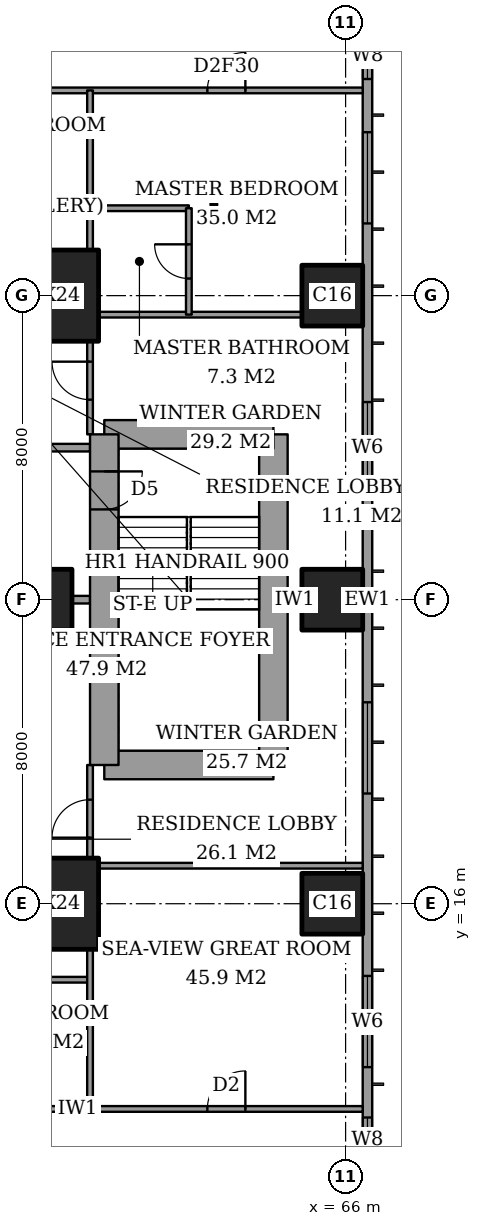
"""IFC4 building model, lengths in metres.
Left out: names, types, materials, properties, quantities, classifications, styles, units other than length and angle.
Written with IfcOpenShell. Run it as: python <this file> out.ifc"""

import sys

from ifc_helpers import new_model, si_unit, direction, frame, frame_2d, origin, origin_2d, place, context, subcontext, project, spatial, rectangle, extrude, element, fill, save


model = new_model("IFC4")
c1 = context("Model", 3, precision=1e-05, world=origin(), true_north=direction((0.0, 1.0)))
c2 = subcontext(c1, "Body", "Model", "MODEL_VIEW")
j1 = project(units=[si_unit("LENGTHUNIT", "METRE"), si_unit("PLANEANGLEUNIT", "RADIAN")], contexts=[c1])
p1 = place(None, origin())
s1 = spatial("IfcSite", under=j1, at=p1, CompositionType="ELEMENT")
p2 = place(p1, origin())
s2 = spatial("IfcBuilding", under=s1, at=p2, CompositionType="ELEMENT")
p3 = place(p2, frame((0.0, 0.0, 270.0)))
s3 = spatial("IfcBuildingStorey", under=s2, at=p3, CompositionType="ELEMENT", Elevation=270.0)
p4 = place(p3, frame((58.0, 16.0, 0.0), z_axis=(0.0, 0.0, 1.0), x_axis=(1.0, 0.0, 0.0)))
e1 = element("IfcColumn", 1, at=p4, inside=s3, PredefinedType="COLUMN", context=c2, shape_type="SweptSolid", body=[
    extrude(rectangle(XDim=3.0, YDim=2.4, at=origin_2d()), origin(), (0.0, 0.0, 1.0), 3.6),
])
p5 = place(p3, frame((58.0, 24.0, 0.0), z_axis=(0.0, 0.0, 1.0), x_axis=(1.0, 0.0, 0.0)))
e2 = element("IfcColumn", 2, at=p5, inside=s3, PredefinedType="COLUMN", context=c2, shape_type="SweptSolid", body=[
    extrude(rectangle(XDim=1.6, YDim=1.6, at=origin_2d()), origin(), (0.0, 0.0, 1.0), 3.6),
])
p6 = place(p3, frame((58.0, 32.0, 0.0), z_axis=(0.0, 0.0, 1.0), x_axis=(1.0, 0.0, 0.0)))
e3 = element("IfcColumn", 3, at=p6, inside=s3, PredefinedType="COLUMN", context=c2, shape_type="SweptSolid", body=[
    extrude(rectangle(XDim=3.0, YDim=2.4, at=origin_2d()), origin(), (0.0, 0.0, 1.0), 3.6),
])
for number, where, z_axis, x_axis in (
    (4, (65.65, 16.0, 0.0), (0.0, 0.0, 1.0), (1.0, 0.0, 0.0)),
    (5, (65.65, 24.0, 0.0), (0.0, 0.0, 1.0), (1.0, 0.0, 0.0)),
    (6, (65.65, 32.0, 0.0), (0.0, 0.0, 1.0), (1.0, 0.0, 0.0)),
):
    element("IfcColumn", number, at=place(p3, frame(where, z_axis=z_axis, x_axis=x_axis)), inside=s3, PredefinedType="COLUMN", context=c2, shape_type="SweptSolid", body=[
        extrude(rectangle(XDim=1.6, YDim=1.6, at=origin_2d()), origin(), (0.0, 0.0, 1.0), 3.6),
    ])
p7 = place(p3, frame((59.65, 19.65, 0.0), z_axis=(0.0, 0.0, 1.0), x_axis=(1.0, 0.0, 0.0)))
e7 = element("IfcWall", 7, at=p7, inside=s3, PredefinedType="SHEAR", context=c2, shape_type="SweptSolid", body=[
    extrude(rectangle(XDim=4.45, YDim=0.75, at=frame_2d((2.225, 0.0))), origin(), (0.0, 0.0, 1.0), 3.6),
])
p8 = place(p3, frame((64.1, 19.65, 0.0), z_axis=(0.0, 0.0, 1.0), x_axis=(0.0, 1.0, 0.0)))
e8 = element("IfcWall", 8, at=p8, inside=s3, PredefinedType="SHEAR", context=c2, shape_type="SweptSolid", body=[
    extrude(rectangle(XDim=8.7, YDim=0.75, at=frame_2d((4.35, 0.0))), origin(), (0.0, 0.0, 1.0), 3.6),
])
p9 = place(p3, frame((64.1, 28.35, 0.0), z_axis=(0.0, 0.0, 1.0), x_axis=(-1.0, 0.0, 0.0)))
e9 = element("IfcWall", 9, at=p9, inside=s3, PredefinedType="SHEAR", context=c2, shape_type="SweptSolid", body=[
    extrude(rectangle(XDim=4.45, YDim=0.75, at=frame_2d((2.225, 0.0))), origin(), (0.0, 0.0, 1.0), 3.6),
])
p10 = place(p3, frame((59.65, 28.35, 0.0), z_axis=(0.0, 0.0, 1.0), x_axis=(0.0, -1.0, 0.0)))
e10 = element("IfcWall", 10, at=p10, inside=s3, PredefinedType="SHEAR", context=c2, shape_type="SweptSolid", body=[
    extrude(rectangle(XDim=8.7, YDim=0.75, at=frame_2d((4.35, 0.0))), origin(), (0.0, 0.0, 1.0), 3.6),
])
p11 = place(p10, frame((0.975, 0.0, 0.0)))
e11 = element("IfcOpeningElement", 11, at=p11, cuts=e10, PredefinedType="OPENING", context=c2, shape_type="SweptSolid", body=[
    extrude(rectangle(XDim=1.0, YDim=2.1, at=frame_2d((0.5, 1.05))), frame((0.0, 0.385, 0.0), z_axis=(0.0, -1.0, 0.0), x_axis=(1.0, 0.0, 0.0)), (0.0, 0.0, 1.0), 0.77),
])
p12 = place(p3, frame((66.575, 3.175, 0.0), z_axis=(0.0, 0.0, 1.0), x_axis=(0.0, 1.0, 0.0)))
e12 = element("IfcWall", 12, at=p12, inside=s3, PredefinedType="SOLIDWALL", context=c2, shape_type="SweptSolid", body=[
    extrude(rectangle(XDim=41.65, YDim=0.25, at=frame_2d((20.825, 0.0))), origin(), (0.0, 0.0, 1.0), 3.6),
])
p13 = place(p12, frame((0.875, 0.0, 0.6)))
e13 = element("IfcOpeningElement", 13, at=p13, cuts=e12, PredefinedType="OPENING", context=c2, shape_type="SweptSolid", body=[
    extrude(rectangle(XDim=2.4, YDim=2.0, at=frame_2d((1.2, 1.0))), frame((0.0, 0.135, 0.0), z_axis=(0.0, -1.0, 0.0), x_axis=(1.0, 0.0, 0.0)), (0.0, 0.0, 1.0), 0.27),
])
p14 = place(p12, frame((6.0, 0.0, 0.6)))
e14 = element("IfcOpeningElement", 14, at=p14, cuts=e12, PredefinedType="OPENING", context=c2, shape_type="SweptSolid", body=[
    extrude(rectangle(XDim=1.2, YDim=2.0, at=frame_2d((0.6, 1.0))), frame((0.0, 0.135, 0.0), z_axis=(0.0, -1.0, 0.0), x_axis=(1.0, 0.0, 0.0)), (0.0, 0.0, 1.0), 0.27),
])
p15 = place(p12, frame((8.525, 0.0, 0.6)))
e15 = element("IfcOpeningElement", 15, at=p15, cuts=e12, PredefinedType="OPENING", context=c2, shape_type="SweptSolid", body=[
    extrude(rectangle(XDim=2.4, YDim=2.0, at=frame_2d((1.2, 1.0))), frame((0.0, 0.135, 0.0), z_axis=(0.0, -1.0, 0.0), x_axis=(1.0, 0.0, 0.0)), (0.0, 0.0, 1.0), 0.27),
])
p16 = place(p12, frame((15.725, 0.0, 0.6)))
e16 = element("IfcOpeningElement", 16, at=p16, cuts=e12, PredefinedType="OPENING", context=c2, shape_type="SweptSolid", body=[
    extrude(rectangle(XDim=2.4, YDim=2.0, at=frame_2d((1.2, 1.0))), frame((0.0, 0.135, 0.0), z_axis=(0.0, -1.0, 0.0), x_axis=(1.0, 0.0, 0.0)), (0.0, 0.0, 1.0), 0.27),
])
p17 = place(p12, frame((23.625, 0.0, 0.6)))
e17 = element("IfcOpeningElement", 17, at=p17, cuts=e12, PredefinedType="OPENING", context=c2, shape_type="SweptSolid", body=[
    extrude(rectangle(XDim=2.4, YDim=2.0, at=frame_2d((1.2, 1.0))), frame((0.0, 0.135, 0.0), z_axis=(0.0, -1.0, 0.0), x_axis=(1.0, 0.0, 0.0)), (0.0, 0.0, 1.0), 0.27),
])
p18 = place(p12, frame((30.725, 0.0, 0.6)))
e18 = element("IfcOpeningElement", 18, at=p18, cuts=e12, PredefinedType="OPENING", context=c2, shape_type="SweptSolid", body=[
    extrude(rectangle(XDim=2.4, YDim=2.0, at=frame_2d((1.2, 1.0))), frame((0.0, 0.135, 0.0), z_axis=(0.0, -1.0, 0.0), x_axis=(1.0, 0.0, 0.0)), (0.0, 0.0, 1.0), 0.27),
])
p19 = place(p12, frame((34.525, 0.0, 0.6)))
e19 = element("IfcOpeningElement", 19, at=p19, cuts=e12, PredefinedType="OPENING", context=c2, shape_type="SweptSolid", body=[
    extrude(rectangle(XDim=1.2, YDim=2.0, at=frame_2d((0.6, 1.0))), frame((0.0, 0.135, 0.0), z_axis=(0.0, -1.0, 0.0), x_axis=(1.0, 0.0, 0.0)), (0.0, 0.0, 1.0), 0.27),
])
p20 = place(p12, frame((38.375, 0.0, 0.6)))
e20 = element("IfcOpeningElement", 20, at=p20, cuts=e12, PredefinedType="OPENING", context=c2, shape_type="SweptSolid", body=[
    extrude(rectangle(XDim=2.4, YDim=2.0, at=frame_2d((1.2, 1.0))), frame((0.0, 0.135, 0.0), z_axis=(0.0, -1.0, 0.0), x_axis=(1.0, 0.0, 0.0)), (0.0, 0.0, 1.0), 0.27),
])
p21 = place(p3, frame((41.439, 10.6, 0.0), z_axis=(0.0, 0.0, 1.0), x_axis=(1.0, 0.0, 0.0)))
e21 = element("IfcWall", 21, at=p21, inside=s3, PredefinedType="PARTITIONING", context=c2, shape_type="SweptSolid", body=[
    extrude(rectangle(XDim=25.011, YDim=0.15, at=frame_2d((12.505, 0.0))), origin(), (0.0, 0.0, 1.0), 3.35),
])
p22 = place(p21, frame((10.761, 0.0, 0.0)))
e22 = element("IfcOpeningElement", 22, at=p22, cuts=e21, PredefinedType="OPENING", context=c2, shape_type="SweptSolid", body=[
    extrude(rectangle(XDim=1.0, YDim=2.1, at=frame_2d((0.5, 1.05))), frame((0.0, 0.085, 0.0), z_axis=(0.0, -1.0, 0.0), x_axis=(1.0, 0.0, 0.0)), (0.0, 0.0, 1.0), 0.17),
])
p23 = place(p21, frame((20.924, 0.0, 0.0)))
e23 = element("IfcOpeningElement", 23, at=p23, cuts=e21, PredefinedType="OPENING", context=c2, shape_type="SweptSolid", body=[
    extrude(rectangle(XDim=1.0, YDim=2.1, at=frame_2d((0.5, 1.05))), frame((0.0, 0.085, 0.0), z_axis=(0.0, -1.0, 0.0), x_axis=(1.0, 0.0, 0.0)), (0.0, 0.0, 1.0), 0.17),
])
p24 = place(p21, frame((15.749, 0.0, 0.0)))
e24 = element("IfcOpeningElement", 24, at=p24, cuts=e21, PredefinedType="OPENING", context=c2, shape_type="SweptSolid", body=[
    extrude(rectangle(XDim=0.9, YDim=2.1, at=frame_2d((0.45, 1.05))), frame((0.0, 0.085, 0.0), z_axis=(0.0, -1.0, 0.0), x_axis=(1.0, 0.0, 0.0)), (0.0, 0.0, 1.0), 0.17),
])
p25 = place(p21, frame((12.961, 0.0, 0.0)))
e25 = element("IfcOpeningElement", 25, at=p25, cuts=e21, PredefinedType="OPENING", context=c2, shape_type="SweptSolid", body=[
    extrude(rectangle(XDim=1.0, YDim=2.1, at=frame_2d((0.5, 1.05))), frame((0.0, 0.085, 0.0), z_axis=(0.0, -1.0, 0.0), x_axis=(1.0, 0.0, 0.0)), (0.0, 0.0, 1.0), 0.17),
])
p26 = place(p21, frame((7.911, 0.0, 0.0)))
e26 = element("IfcOpeningElement", 26, at=p26, cuts=e21, PredefinedType="OPENING", context=c2, shape_type="SweptSolid", body=[
    extrude(rectangle(XDim=0.9, YDim=2.1, at=frame_2d((0.45, 1.05))), frame((0.0, 0.085, 0.0), z_axis=(0.0, -1.0, 0.0), x_axis=(1.0, 0.0, 0.0)), (0.0, 0.0, 1.0), 0.17),
])
p27 = place(p21, frame((2.836, 0.0, 0.0)))
e27 = element("IfcOpeningElement", 27, at=p27, cuts=e21, PredefinedType="OPENING", context=c2, shape_type="SweptSolid", body=[
    extrude(rectangle(XDim=1.0, YDim=2.1, at=frame_2d((0.5, 1.05))), frame((0.0, 0.085, 0.0), z_axis=(0.0, -1.0, 0.0), x_axis=(1.0, 0.0, 0.0)), (0.0, 0.0, 1.0), 0.17),
])
p28 = place(p3, frame((56.0, 14.0, 0.0), z_axis=(0.0, 0.0, 1.0), x_axis=(1.0, 0.0, 0.0)))
e28 = element("IfcWall", 28, at=p28, inside=s3, PredefinedType="PARTITIONING", context=c2, shape_type="SweptSolid", body=[
    extrude(rectangle(XDim=3.275, YDim=0.15, at=frame_2d((1.637, 0.0))), origin(), (0.0, 0.0, 1.0), 3.35),
])
p29 = place(p3, frame((59.5, 17.0, 0.0), z_axis=(0.0, 0.0, 1.0), x_axis=(1.0, 0.0, 0.0)))
e29 = element("IfcWall", 29, at=p29, inside=s3, PredefinedType="PARTITIONING", context=c2, shape_type="SweptSolid", body=[
    extrude(rectangle(XDim=6.95, YDim=0.15, at=frame_2d((3.475, 0.0))), origin(), (0.0, 0.0, 1.0), 3.35),
])
p30 = place(p3, frame((58.8, 24.0, 0.0), z_axis=(0.0, 0.0, 1.0), x_axis=(1.0, 0.0, 0.0)))
e30 = element("IfcWall", 30, at=p30, inside=s3, PredefinedType="PARTITIONING", context=c2, shape_type="SweptSolid", body=[
    extrude(rectangle(XDim=0.475, YDim=0.2, at=frame_2d((0.237, 0.0))), origin(), (0.0, 0.0, 1.0), 3.35),
])
p31 = place(p3, frame((64.475, 24.0, 0.0), z_axis=(0.0, 0.0, 1.0), x_axis=(1.0, 0.0, 0.0)))
e31 = element("IfcWall", 31, at=p31, inside=s3, PredefinedType="PARTITIONING", context=c2, shape_type="SweptSolid", body=[
    extrude(rectangle(XDim=0.375, YDim=0.15, at=frame_2d((0.188, 0.0))), origin(), (0.0, 0.0, 1.0), 3.35),
])
p32 = place(p3, frame((42.0, 28.0, 0.0), z_axis=(0.0, 0.0, 1.0), x_axis=(1.0, 0.0, 0.0)))
e32 = element("IfcWall", 32, at=p32, inside=s3, PredefinedType="PARTITIONING", context=c2, shape_type="SweptSolid", body=[
    extrude(rectangle(XDim=17.275, YDim=0.2, at=frame_2d((8.637, 0.0))), origin(), (0.0, 0.0, 1.0), 3.35),
])
p33 = place(p32, frame((9.1, 0.0, 0.0)))
e33 = element("IfcOpeningElement", 33, at=p33, cuts=e32, PredefinedType="OPENING", context=c2, shape_type="SweptSolid", body=[
    extrude(rectangle(XDim=1.2, YDim=2.4, at=frame_2d((0.6, 1.2))), frame((0.0, 0.11, 0.0), z_axis=(0.0, -1.0, 0.0), x_axis=(1.0, 0.0, 0.0)), (0.0, 0.0, 1.0), 0.22),
])
p34 = place(p3, frame((59.5, 31.5, 0.0), z_axis=(0.0, 0.0, 1.0), x_axis=(1.0, 0.0, 0.0)))
e34 = element("IfcWall", 34, at=p34, inside=s3, PredefinedType="PARTITIONING", context=c2, shape_type="SweptSolid", body=[
    extrude(rectangle(XDim=5.35, YDim=0.15, at=frame_2d((2.675, 0.0))), origin(), (0.0, 0.0, 1.0), 3.35),
])
p35 = place(p3, frame((59.275, 34.3, 0.0), z_axis=(0.0, 0.0, 1.0), x_axis=(1.0, 0.0, 0.0)))
e35 = element("IfcWall", 35, at=p35, inside=s3, PredefinedType="PARTITIONING", context=c2, shape_type="SweptSolid", body=[
    extrude(rectangle(XDim=2.6, YDim=0.15, at=frame_2d((1.3, 0.0))), origin(), (0.0, 0.0, 1.0), 3.35),
])
p36 = place(p3, frame((41.439, 37.4, 0.0), z_axis=(0.0, 0.0, 1.0), x_axis=(1.0, 0.0, 0.0)))
e36 = element("IfcWall", 36, at=p36, inside=s3, PredefinedType="PARTITIONING", context=c2, shape_type="SweptSolid", body=[
    extrude(rectangle(XDim=25.011, YDim=0.15, at=frame_2d((12.505, 0.0))), origin(), (0.0, 0.0, 1.0), 3.35),
])
p37 = place(p36, frame((12.361, 0.0, 0.0)))
e37 = element("IfcOpeningElement", 37, at=p37, cuts=e36, PredefinedType="OPENING", context=c2, shape_type="SweptSolid", body=[
    extrude(rectangle(XDim=1.0, YDim=2.1, at=frame_2d((0.5, 1.05))), frame((0.0, 0.085, 0.0), z_axis=(0.0, -1.0, 0.0), x_axis=(1.0, 0.0, 0.0)), (0.0, 0.0, 1.0), 0.17),
])
p38 = place(p36, frame((20.924, 0.0, 0.0)))
e38 = element("IfcOpeningElement", 38, at=p38, cuts=e36, PredefinedType="OPENING", context=c2, shape_type="SweptSolid", body=[
    extrude(rectangle(XDim=1.0, YDim=2.1, at=frame_2d((0.5, 1.05))), frame((0.0, 0.085, 0.0), z_axis=(0.0, -1.0, 0.0), x_axis=(1.0, 0.0, 0.0)), (0.0, 0.0, 1.0), 0.17),
])
p39 = place(p36, frame((15.448, 0.0, 0.0)))
e39 = element("IfcOpeningElement", 39, at=p39, cuts=e36, PredefinedType="OPENING", context=c2, shape_type="SweptSolid", body=[
    extrude(rectangle(XDim=0.9, YDim=2.1, at=frame_2d((0.45, 1.05))), frame((0.0, 0.085, 0.0), z_axis=(0.0, -1.0, 0.0), x_axis=(1.0, 0.0, 0.0)), (0.0, 0.0, 1.0), 0.17),
])
p40 = place(p36, frame((8.661, 0.0, 0.0)))
e40 = element("IfcOpeningElement", 40, at=p40, cuts=e36, PredefinedType="OPENING", context=c2, shape_type="SweptSolid", body=[
    extrude(rectangle(XDim=1.0, YDim=2.1, at=frame_2d((0.5, 1.05))), frame((0.0, 0.085, 0.0), z_axis=(0.0, -1.0, 0.0), x_axis=(1.0, 0.0, 0.0)), (0.0, 0.0, 1.0), 0.17),
])
p41 = place(p36, frame((2.836, 0.0, 0.0)))
e41 = element("IfcOpeningElement", 41, at=p41, cuts=e36, PredefinedType="OPENING", context=c2, shape_type="SweptSolid", body=[
    extrude(rectangle(XDim=1.0, YDim=2.1, at=frame_2d((0.5, 1.05))), frame((0.0, 0.085, 0.0), z_axis=(0.0, -1.0, 0.0), x_axis=(1.0, 0.0, 0.0)), (0.0, 0.0, 1.0), 0.17),
])
p42 = place(p3, frame((59.275, 10.6, 0.0), z_axis=(0.0, 0.0, 1.0), x_axis=(0.0, 1.0, 0.0)))
e42 = element("IfcWall", 42, at=p42, inside=s3, PredefinedType="PARTITIONING", context=c2, shape_type="SweptSolid", body=[
    extrude(rectangle(XDim=4.2, YDim=0.15, at=frame_2d((2.1, 0.0))), origin(), (0.0, 0.0, 1.0), 3.35),
])
p43 = place(p3, frame((59.275, 17.2, 0.0), z_axis=(0.0, 0.0, 1.0), x_axis=(0.0, 1.0, 0.0)))
e43 = element("IfcWall", 43, at=p43, inside=s3, PredefinedType="PARTITIONING", context=c2, shape_type="SweptSolid", body=[
    extrude(rectangle(XDim=2.45, YDim=0.15, at=frame_2d((1.225, 0.0))), origin(), (0.0, 0.0, 1.0), 3.35),
])
p44 = place(p43, frame((0.538, 0.0, 0.0)))
e44 = element("IfcOpeningElement", 44, at=p44, cuts=e43, PredefinedType="OPENING", context=c2, shape_type="SweptSolid", body=[
    extrude(rectangle(XDim=1.0, YDim=2.1, at=frame_2d((0.5, 1.05))), frame((0.0, 0.085, 0.0), z_axis=(0.0, -1.0, 0.0), x_axis=(1.0, 0.0, 0.0)), (0.0, 0.0, 1.0), 0.17),
])
p45 = place(p3, frame((59.275, 28.35, 0.0), z_axis=(0.0, 0.0, 1.0), x_axis=(0.0, 1.0, 0.0)))
e45 = element("IfcWall", 45, at=p45, inside=s3, PredefinedType="PARTITIONING", context=c2, shape_type="SweptSolid", body=[
    extrude(rectangle(XDim=2.45, YDim=0.15, at=frame_2d((1.225, 0.0))), origin(), (0.0, 0.0, 1.0), 3.35),
])
p46 = place(p45, frame((0.913, 0.0, 0.0)))
e46 = element("IfcOpeningElement", 46, at=p46, cuts=e45, PredefinedType="OPENING", context=c2, shape_type="SweptSolid", body=[
    extrude(rectangle(XDim=1.0, YDim=2.1, at=frame_2d((0.5, 1.05))), frame((0.0, 0.085, 0.0), z_axis=(0.0, -1.0, 0.0), x_axis=(1.0, 0.0, 0.0)), (0.0, 0.0, 1.0), 0.17),
])
p47 = place(p3, frame((59.275, 33.2, 0.0), z_axis=(0.0, 0.0, 1.0), x_axis=(0.0, 1.0, 0.0)))
e47 = element("IfcWall", 47, at=p47, inside=s3, PredefinedType="PARTITIONING", context=c2, shape_type="SweptSolid", body=[
    extrude(rectangle(XDim=4.2, YDim=0.15, at=frame_2d((2.1, 0.0))), origin(), (0.0, 0.0, 1.0), 3.35),
])
p48 = place(p3, frame((61.875, 31.5, 0.0), z_axis=(0.0, 0.0, 1.0), x_axis=(0.0, 1.0, 0.0)))
e48 = element("IfcWall", 48, at=p48, inside=s3, PredefinedType="PARTITIONING", context=c2, shape_type="SweptSolid", body=[
    extrude(rectangle(XDim=2.8, YDim=0.15, at=frame_2d((1.4, 0.0))), origin(), (0.0, 0.0, 1.0), 3.35),
])
p49 = place(p48, frame((0.95, 0.0, 0.0)))
e49 = element("IfcOpeningElement", 49, at=p49, cuts=e48, PredefinedType="OPENING", context=c2, shape_type="SweptSolid", body=[
    extrude(rectangle(XDim=0.9, YDim=2.1, at=frame_2d((0.45, 1.05))), frame((0.0, 0.085, 0.0), z_axis=(0.0, -1.0, 0.0), x_axis=(1.0, 0.0, 0.0)), (0.0, 0.0, 1.0), 0.17),
])
p50 = place(p14, origin())
e50 = element("IfcWindow", 50, at=p50, inside=s3, PartitioningType="SINGLE_PANEL", PredefinedType="WINDOW", context=c2, shape_type="SweptSolid", body=[
    extrude(rectangle(XDim=1.2, YDim=2.0, at=frame_2d((0.6, 1.0))), frame((0.0, 0.03, 0.0), z_axis=(0.0, -1.0, 0.0), x_axis=(1.0, 0.0, 0.0)), (0.0, 0.0, 1.0), 0.06),
])
fill(e14, e50)
p51 = place(p15, origin())
e51 = element("IfcWindow", 51, at=p51, inside=s3, PartitioningType="SINGLE_PANEL", PredefinedType="WINDOW", context=c2, shape_type="SweptSolid", body=[
    extrude(rectangle(XDim=2.4, YDim=2.0, at=frame_2d((1.2, 1.0))), frame((0.0, 0.03, 0.0), z_axis=(0.0, -1.0, 0.0), x_axis=(1.0, 0.0, 0.0)), (0.0, 0.0, 1.0), 0.06),
])
fill(e15, e51)
p52 = place(p16, origin())
e52 = element("IfcWindow", 52, at=p52, inside=s3, PartitioningType="SINGLE_PANEL", PredefinedType="WINDOW", context=c2, shape_type="SweptSolid", body=[
    extrude(rectangle(XDim=2.4, YDim=2.0, at=frame_2d((1.2, 1.0))), frame((0.0, 0.03, 0.0), z_axis=(0.0, -1.0, 0.0), x_axis=(1.0, 0.0, 0.0)), (0.0, 0.0, 1.0), 0.06),
])
fill(e16, e52)
p53 = place(p17, origin())
e53 = element("IfcWindow", 53, at=p53, inside=s3, PartitioningType="SINGLE_PANEL", PredefinedType="WINDOW", context=c2, shape_type="SweptSolid", body=[
    extrude(rectangle(XDim=2.4, YDim=2.0, at=frame_2d((1.2, 1.0))), frame((0.0, 0.03, 0.0), z_axis=(0.0, -1.0, 0.0), x_axis=(1.0, 0.0, 0.0)), (0.0, 0.0, 1.0), 0.06),
])
fill(e17, e53)
p54 = place(p18, origin())
e54 = element("IfcWindow", 54, at=p54, inside=s3, PartitioningType="SINGLE_PANEL", PredefinedType="WINDOW", context=c2, shape_type="SweptSolid", body=[
    extrude(rectangle(XDim=2.4, YDim=2.0, at=frame_2d((1.2, 1.0))), frame((0.0, 0.03, 0.0), z_axis=(0.0, -1.0, 0.0), x_axis=(1.0, 0.0, 0.0)), (0.0, 0.0, 1.0), 0.06),
])
fill(e18, e54)
p55 = place(p19, origin())
e55 = element("IfcWindow", 55, at=p55, inside=s3, PartitioningType="SINGLE_PANEL", PredefinedType="WINDOW", context=c2, shape_type="SweptSolid", body=[
    extrude(rectangle(XDim=1.2, YDim=2.0, at=frame_2d((0.6, 1.0))), frame((0.0, 0.03, 0.0), z_axis=(0.0, -1.0, 0.0), x_axis=(1.0, 0.0, 0.0)), (0.0, 0.0, 1.0), 0.06),
])
fill(e19, e55)
p56 = place(p23, origin())
e56 = element("IfcDoor", 56, at=p56, inside=s3, OperationType="SINGLE_SWING_LEFT", PredefinedType="DOOR", context=c2, shape_type="SweptSolid", body=[
    extrude(rectangle(XDim=1.0, YDim=2.1, at=frame_2d((0.5, 1.05))), frame((0.0, 0.025, 0.0), z_axis=(0.0, -1.0, 0.0), x_axis=(1.0, 0.0, 0.0)), (0.0, 0.0, 1.0), 0.05),
])
fill(e23, e56)
p57 = place(p44, origin())
e57 = element("IfcDoor", 57, at=p57, inside=s3, OperationType="SINGLE_SWING_RIGHT", PredefinedType="DOOR", context=c2, shape_type="SweptSolid", body=[
    extrude(rectangle(XDim=1.0, YDim=2.1, at=frame_2d((0.5, 1.05))), frame((0.0, 0.025, 0.0), z_axis=(0.0, -1.0, 0.0), x_axis=(1.0, 0.0, 0.0)), (0.0, 0.0, 1.0), 0.05),
])
fill(e44, e57)
p58 = place(p49, origin())
e58 = element("IfcDoor", 58, at=p58, inside=s3, OperationType="SINGLE_SWING_LEFT", PredefinedType="DOOR", context=c2, shape_type="SweptSolid", body=[
    extrude(rectangle(XDim=0.9, YDim=2.1, at=frame_2d((0.45, 1.05))), frame((0.0, 0.025, 0.0), z_axis=(0.0, -1.0, 0.0), x_axis=(1.0, 0.0, 0.0)), (0.0, 0.0, 1.0), 0.05),
])
fill(e49, e58)
p59 = place(p38, origin())
e59 = element("IfcDoor", 59, at=p59, inside=s3, OperationType="SINGLE_SWING_LEFT", PredefinedType="DOOR", context=c2, shape_type="SweptSolid", body=[
    extrude(rectangle(XDim=1.0, YDim=2.1, at=frame_2d((0.5, 1.05))), frame((0.0, 0.025, 0.0), z_axis=(0.0, -1.0, 0.0), x_axis=(1.0, 0.0, 0.0)), (0.0, 0.0, 1.0), 0.05),
])
fill(e38, e59)
p60 = place(p46, origin())
e60 = element("IfcDoor", 60, at=p60, inside=s3, OperationType="SINGLE_SWING_LEFT", PredefinedType="DOOR", context=c2, shape_type="SweptSolid", body=[
    extrude(rectangle(XDim=1.0, YDim=2.1, at=frame_2d((0.5, 1.05))), frame((0.0, 0.025, 0.0), z_axis=(0.0, -1.0, 0.0), x_axis=(1.0, 0.0, 0.0)), (0.0, 0.0, 1.0), 0.05),
])
fill(e46, e60)
p61 = place(p11, origin())
e61 = element("IfcDoor", 61, at=p61, inside=s3, OperationType="SINGLE_SWING_RIGHT", PredefinedType="DOOR", context=c2, shape_type="SweptSolid", body=[
    extrude(rectangle(XDim=1.0, YDim=2.1, at=frame_2d((0.5, 1.05))), frame((0.0, 0.025, 0.0), z_axis=(0.0, -1.0, 0.0), x_axis=(1.0, 0.0, 0.0)), (0.0, 0.0, 1.0), 0.05),
])
fill(e11, e61)
save(model, sys.argv[1])
